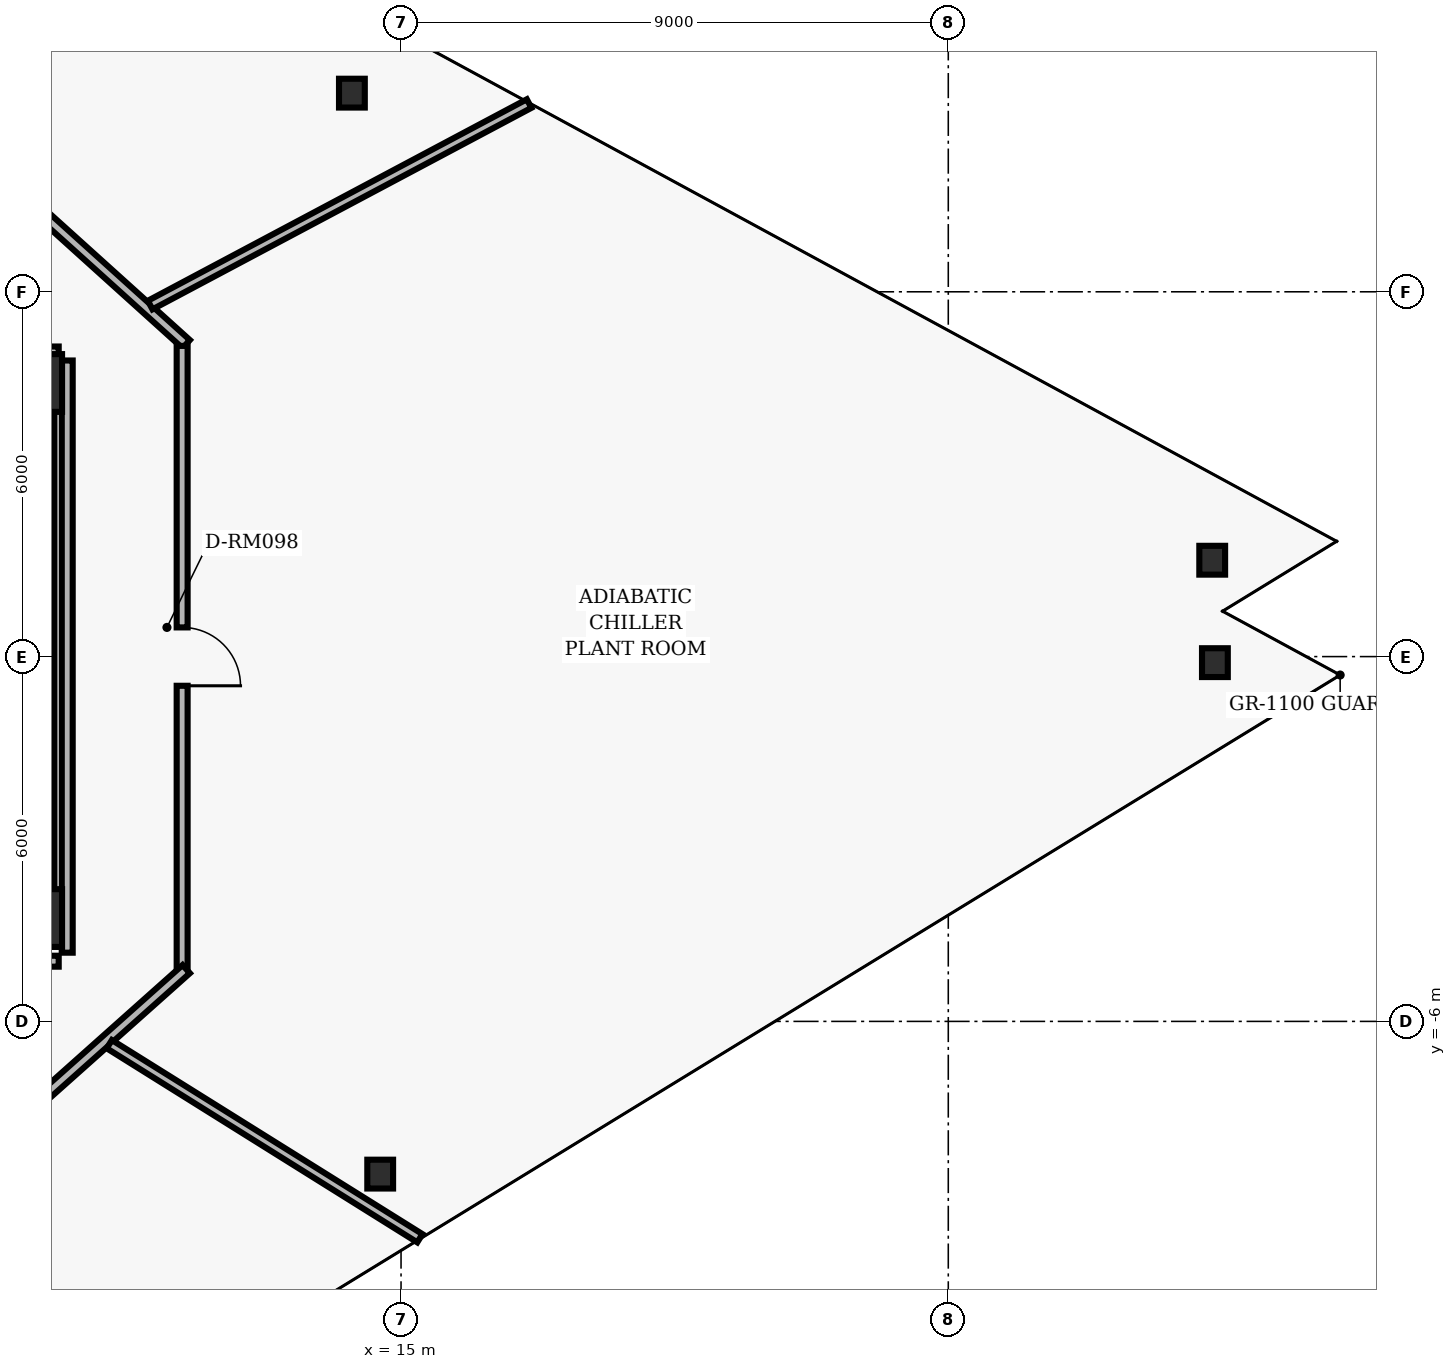
"""IFC4 building model, lengths in metres.
Left out: names, types, materials, properties, quantities, classifications, styles, units other than length and angle.
Written with IfcOpenShell. Run it as: python <this file> out.ifc"""

import sys

from ifc_helpers import new_model, si_unit, direction, frame, frame_2d, origin, origin_2d, place, context, subcontext, project, spatial, rectangle, hollow_rectangle, i_section, extrude, element, fill, save


model = new_model("IFC4")
c1 = context("Model", 3, precision=1e-05, world=origin(), true_north=direction((0.0, 1.0)))
c2 = subcontext(c1, "Body", "Model", "MODEL_VIEW")
j1 = project(units=[si_unit("LENGTHUNIT", "METRE"), si_unit("PLANEANGLEUNIT", "RADIAN")], contexts=[c1])
p1 = place(None, origin())
s1 = spatial("IfcSite", under=j1, at=p1, CompositionType="ELEMENT")
p2 = place(p1, origin())
s2 = spatial("IfcBuilding", under=s1, at=p2, CompositionType="ELEMENT")
p3 = place(p2, frame((0.0, 0.0, 45.76)))
s3 = spatial("IfcBuildingStorey", under=s2, at=p3, CompositionType="ELEMENT", Elevation=45.76)
for number, where, z_axis, x_axis in (
    (1, (8.95, 4.5, 0.0), (0.0, 0.0, 1.0), (1.0, 0.0, 0.0)),
    (2, (8.95, -4.3, 0.0), (0.0, 0.0, 1.0), (1.0, 0.0, 0.0)),
):
    element("IfcColumn", number, at=place(p3, frame(where, z_axis=z_axis, x_axis=x_axis)), inside=s3, PredefinedType="COLUMN", context=c2, shape_type="SweptSolid", body=[
        extrude(hollow_rectangle(XDim=0.95, YDim=0.95, WallThickness=0.06, InnerFilletRadius=0.02, OuterFilletRadius=0.04, at=origin_2d()), origin(), (0.0, 0.0, 1.0), 3.84),
    ])
p4 = place(p3, frame((8.95, -3.825, 0.0), z_axis=(0.0, 0.0, 1.0), x_axis=(0.0, 1.0, 0.0)))
e3 = element("IfcWall", 3, at=p4, inside=s3, PredefinedType="SHEAR", context=c2, shape_type="SweptSolid", body=[
    extrude(rectangle(XDim=7.85, YDim=0.7, at=frame_2d((3.925, 0.0))), origin(), (0.0, 0.0, 1.0), 3.418),
])
for number, where, z_axis, x_axis in (
    (4, (28.341, 1.585, 0.0), (0.0, 0.0, 1.0), (1.0, 0.0, 0.0)),
    (5, (14.192, 9.267, 0.0), (0.0, 0.0, 1.0), (1.0, 0.0, 0.0)),
    (6, (14.657, -8.512, 0.0), (0.0, 0.0, 1.0), (1.0, 0.0, 0.0)),
    (7, (28.385, -0.1, 0.0), (0.0, 0.0, 1.0), (1.0, 0.0, 0.0)),
):
    element("IfcColumn", number, at=place(p3, frame(where, z_axis=z_axis, x_axis=x_axis)), inside=s3, PredefinedType="COLUMN", context=c2, shape_type="SweptSolid", body=[
        extrude(i_section(OverallWidth=0.424, OverallDepth=0.474, WebThickness=0.048, FlangeThickness=0.077, FilletRadius=0.025, at=origin_2d()), origin(), (0.0, 0.0, 1.0), 3.84),
    ])
p5 = place(p3, frame((6.867, 9.29, 0.0), z_axis=(0.0, 0.0, 1.0), x_axis=(0.742486327971, -0.669861219042, 0.0)))
e8 = element("IfcWall", 8, at=p5, inside=s3, PredefinedType="PARTITIONING", context=c2, shape_type="SweptSolid", body=[
    extrude(rectangle(XDim=6.196, YDim=0.18, at=frame_2d((3.098, 0.0))), origin(), (0.0, 0.0, 1.0), 2.907),
])
p6 = place(p3, frame((11.4, 5.11, 0.0), z_axis=(0.0, 0.0, 1.0), x_axis=(0.0, -1.0, 0.0)))
e9 = element("IfcWall", 9, at=p6, inside=s3, PredefinedType="PARTITIONING", context=c2, shape_type="SweptSolid", body=[
    extrude(rectangle(XDim=10.22, YDim=0.18, at=frame_2d((5.11, 0.0))), origin(), (0.0, 0.0, 1.0), 3.393),
])
p7 = place(p6, frame((4.63, 0.0, 0.0)))
e10 = element("IfcOpeningElement", 10, at=p7, cuts=e9, PredefinedType="OPENING", context=c2, shape_type="SweptSolid", body=[
    extrude(rectangle(XDim=0.96, YDim=2.02, at=frame_2d((0.48, 1.01))), frame((0.0, 0.1, 0.0), z_axis=(0.0, -1.0, 0.0), x_axis=(1.0, 0.0, 0.0)), (0.0, 0.0, 1.0), 0.2),
])
p8 = place(p3, frame((11.467, -5.14, 0.0), z_axis=(0.0, 0.0, 1.0), x_axis=(-0.746516597114, -0.665366793756, 0.0)))
e11 = element("IfcWall", 11, at=p8, inside=s3, PredefinedType="PARTITIONING", context=c2, shape_type="SweptSolid", body=[
    extrude(rectangle(XDim=6.342, YDim=0.18, at=frame_2d((3.171, 0.0))), origin(), (0.0, 0.0, 1.0), 2.907),
])
p9 = place(p3, frame((6.03, -5.01, 0.0), z_axis=(0.0, 0.0, 1.0), x_axis=(1.0, 0.0, 0.0)))
e12 = element("IfcWall", 12, at=p9, inside=s3, PredefinedType="PARTITIONING", context=c2, shape_type="SweptSolid", body=[
    extrude(rectangle(XDim=3.34, YDim=0.18, at=frame_2d((1.67, 0.0))), origin(), (0.0, 0.0, 1.0), 3.393),
])
p10 = place(p3, frame((9.51, -4.87, 0.0), z_axis=(0.0, 0.0, 1.0), x_axis=(0.0, 1.0, 0.0)))
e13 = element("IfcWall", 13, at=p10, inside=s3, PredefinedType="PARTITIONING", context=c2, shape_type="SweptSolid", body=[
    extrude(rectangle(XDim=9.74, YDim=0.18, at=frame_2d((4.87, 0.0))), origin(), (0.0, 0.0, 1.0), 3.393),
])
p11 = place(p3, frame((9.37, 5.01, 0.0), z_axis=(0.0, 0.0, 1.0), x_axis=(-1.0, 0.0, 0.0)))
e14 = element("IfcWall", 14, at=p11, inside=s3, PredefinedType="PARTITIONING", context=c2, shape_type="SweptSolid", body=[
    extrude(rectangle(XDim=2.808, YDim=0.18, at=frame_2d((1.404, 0.0))), origin(), (0.0, 0.0, 1.0), 3.393),
])
p12 = place(p3, frame((10.202, -6.375, 0.0), z_axis=(0.0, 0.0, 1.0), x_axis=(0.848052957344, -0.529911484627, 0.0)))
e15 = element("IfcWall", 15, at=p12, inside=s3, PredefinedType="PARTITIONING", context=c2, shape_type="SweptSolid", body=[
    extrude(rectangle(XDim=6.022, YDim=0.16, at=frame_2d((3.011, 0.0))), origin(), (0.0, 0.0, 1.0), 3.393),
])
p13 = place(p3, frame((10.874, 5.782, 0.0), z_axis=(0.0, 0.0, 1.0), x_axis=(0.882939204237, 0.469487339149, 0.0)))
e16 = element("IfcWall", 16, at=p13, inside=s3, PredefinedType="PARTITIONING", context=c2, shape_type="SweptSolid", body=[
    extrude(rectangle(XDim=7.058, YDim=0.16, at=frame_2d((3.529, 0.0))), origin(), (0.0, 0.0, 1.0), 2.6),
])
p14 = place(p7, origin())
e17 = element("IfcDoor", 17, at=p14, inside=s3, OperationType="SINGLE_SWING_RIGHT", PredefinedType="DOOR", context=c2, shape_type="SweptSolid", body=[
    extrude(rectangle(XDim=0.96, YDim=2.02, at=frame_2d((0.48, 1.01))), frame((0.0, 0.025, 0.0), z_axis=(0.0, -1.0, 0.0), x_axis=(1.0, 0.0, 0.0)), (0.0, 0.0, 1.0), 0.05),
])
fill(e10, e17)
save(model, sys.argv[1])
